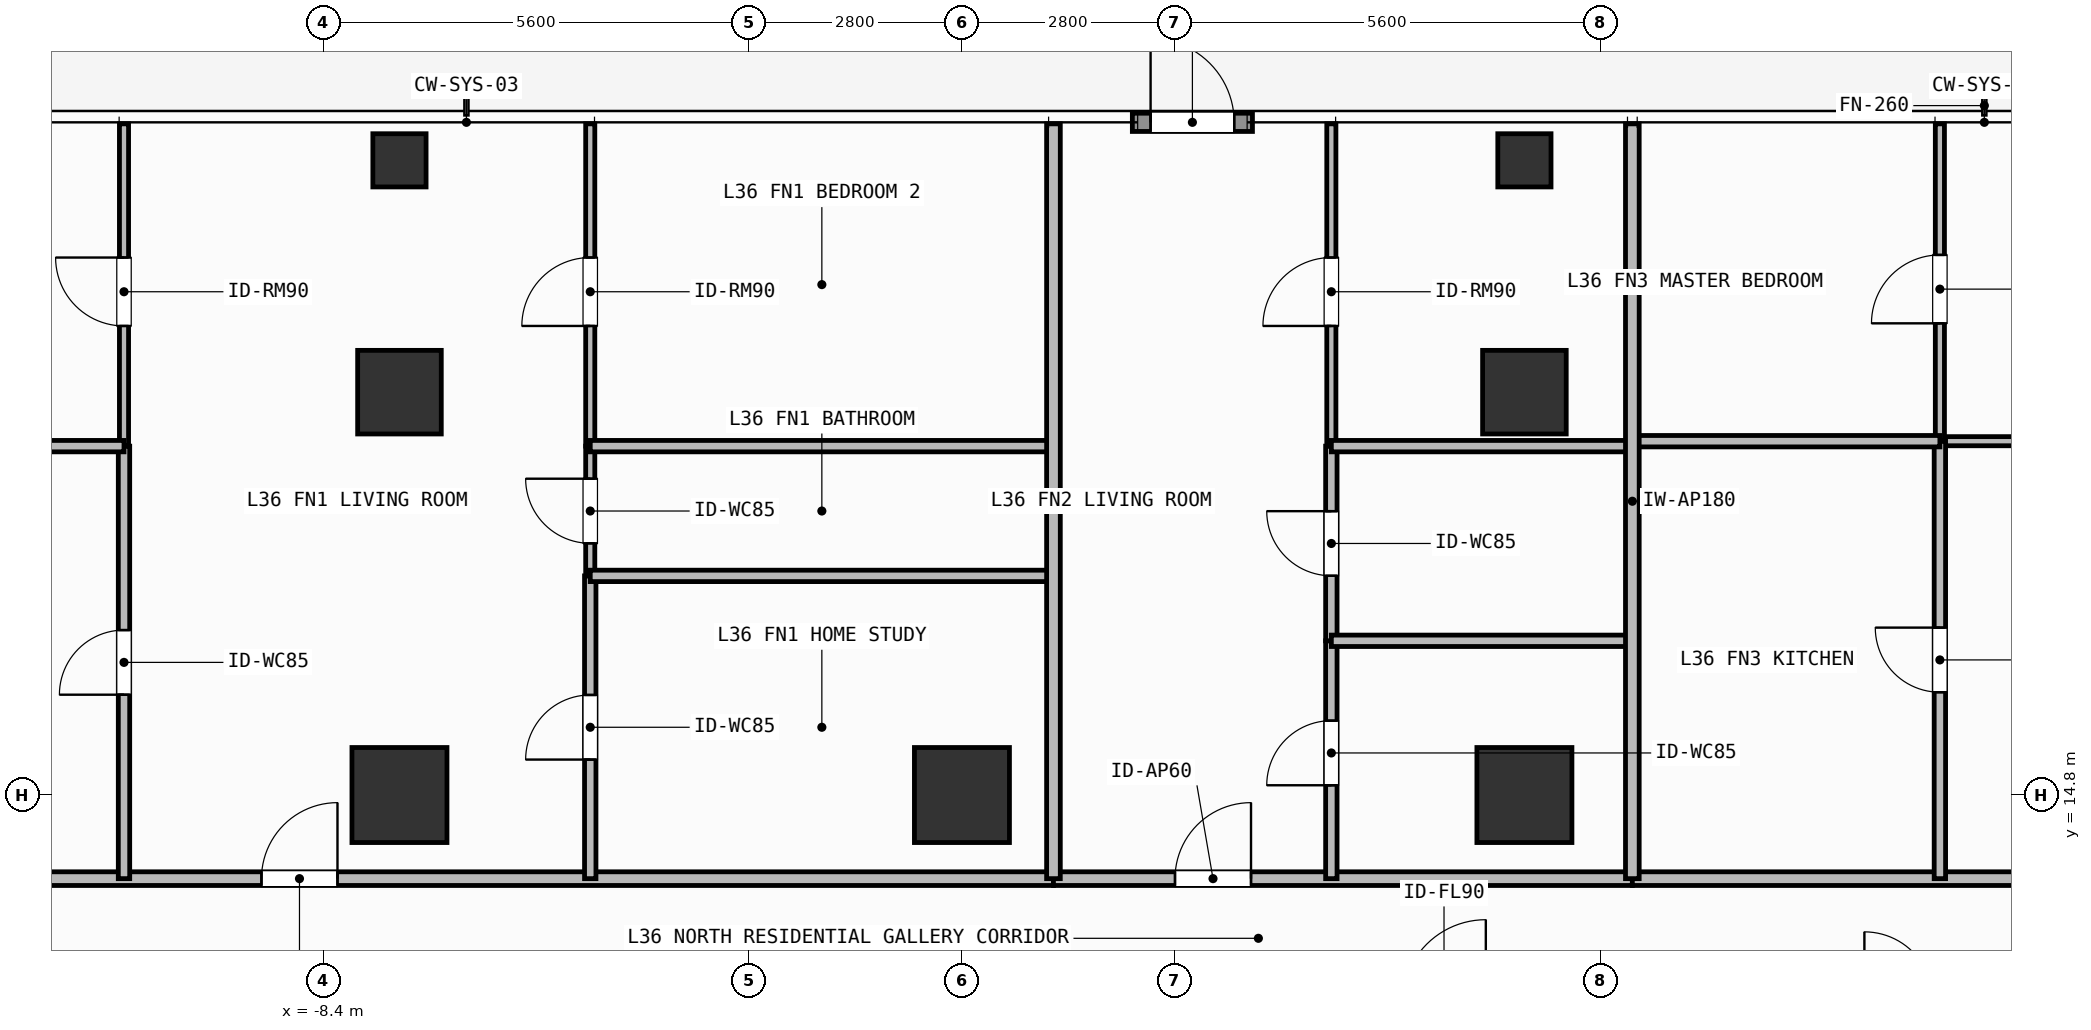
"""IFC4 building model, lengths in metres.
Left out: names, types, materials, properties, quantities, classifications, styles, units other than length and angle.
Written with IfcOpenShell. Run it as: python <this file> out.ifc"""

import sys

from ifc_helpers import new_model, si_unit, direction, frame, frame_2d, origin, origin_2d, place, context, subcontext, project, spatial, rectangle, hollow_rectangle, extrude, element, fill, save


model = new_model("IFC4")
c1 = context("Model", 3, precision=1e-05, world=origin(), true_north=direction((0.0, 1.0)))
c2 = subcontext(c1, "Body", "Model", "MODEL_VIEW")
j1 = project(units=[si_unit("LENGTHUNIT", "METRE"), si_unit("PLANEANGLEUNIT", "RADIAN")], contexts=[c1])
p1 = place(None, origin())
s1 = spatial("IfcSite", under=j1, at=p1, CompositionType="ELEMENT")
p2 = place(p1, origin())
s2 = spatial("IfcBuilding", under=s1, at=p2, CompositionType="ELEMENT")
p3 = place(p2, frame((0.0, 0.0, 144.6)))
s3 = spatial("IfcBuildingStorey", under=s2, at=p3, CompositionType="ELEMENT", Elevation=144.6)
for number, where, z_axis, x_axis in (
    (1, (-7.4, 14.8, 0.0), (0.0, 0.0, 1.0), (1.0, 0.0, 0.0)),
    (2, (0.0, 14.8, 0.0), (0.0, 0.0, 1.0), (1.0, 0.0, 0.0)),
    (3, (7.4, 14.8, 0.0), (0.0, 0.0, 1.0), (1.0, 0.0, 0.0)),
):
    element("IfcColumn", number, at=place(p3, frame(where, z_axis=z_axis, x_axis=x_axis)), inside=s3, PredefinedType="COLUMN", context=c2, shape_type="SweptSolid", body=[
        extrude(rectangle(XDim=1.25, YDim=1.25, at=origin_2d()), origin(), (0.0, 0.0, 1.0), 3.9),
    ])
for number, where, z_axis, x_axis in (
    (4, (-7.4, 20.1, 0.0), (0.0, 0.0, 1.0), (1.0, 0.0, 0.0)),
    (5, (7.4, 20.1, 0.0), (0.0, 0.0, 1.0), (1.0, 0.0, 0.0)),
):
    element("IfcColumn", number, at=place(p3, frame(where, z_axis=z_axis, x_axis=x_axis)), inside=s3, PredefinedType="COLUMN", context=c2, shape_type="SweptSolid", body=[
        extrude(rectangle(XDim=1.1, YDim=1.1, at=origin_2d()), origin(), (0.0, 0.0, 1.0), 3.9),
    ])
for number, where, z_axis, x_axis in (
    (6, (-7.4, 23.15, 0.0), (0.0, 0.0, 1.0), (1.0, 0.0, 0.0)),
    (7, (7.4, 23.15, 0.0), (0.0, 0.0, 1.0), (1.0, 0.0, 0.0)),
):
    element("IfcColumn", number, at=place(p3, frame(where, z_axis=z_axis, x_axis=x_axis)), inside=s3, PredefinedType="COLUMN", context=c2, shape_type="SweptSolid", body=[
        extrude(hollow_rectangle(XDim=0.7, YDim=0.7, WallThickness=0.032, at=origin_2d()), origin(), (0.0, 0.0, 1.0), 3.9),
    ])
p4 = place(p3, frame((2.242, 23.65, 0.0), z_axis=(0.0, 0.0, 1.0), x_axis=(1.0, 0.0, 0.0)))
e8 = element("IfcWall", 8, at=p4, inside=s3, PredefinedType="SOLIDWALL", context=c2, shape_type="SweptSolid", body=[
    extrude(rectangle(XDim=1.58, YDim=0.24, at=frame_2d((0.79, 0.0))), origin(), (0.0, 0.0, 1.0), 3.68),
])
p5 = place(p4, frame((0.24, 0.0, 0.0)))
e9 = element("IfcOpeningElement", 9, at=p5, cuts=e8, PredefinedType="OPENING", context=c2, shape_type="SweptSolid", body=[
    extrude(rectangle(XDim=1.1, YDim=2.2, at=frame_2d((0.55, 1.1))), frame((0.0, 0.13, 0.0), z_axis=(0.0, -1.0, 0.0), x_axis=(1.0, 0.0, 0.0)), (0.0, 0.0, 1.0), 0.26),
])
p6 = place(p3, frame((-16.32, 13.7, 0.0), z_axis=(0.0, 0.0, 1.0), x_axis=(1.0, 0.0, 0.0)))
e10 = element("IfcWall", 10, at=p6, inside=s3, PredefinedType="PARTITIONING", context=c2, shape_type="SweptSolid", body=[
    extrude(rectangle(XDim=17.524, YDim=0.18, at=frame_2d((8.762, 0.0))), origin(), (0.0, 0.0, 1.0), 3.68),
])
p7 = place(p6, frame((7.104, 0.0, 0.0)))
e11 = element("IfcOpeningElement", 11, at=p7, cuts=e10, PredefinedType="OPENING", context=c2, shape_type="SweptSolid", body=[
    extrude(rectangle(XDim=1.0, YDim=2.2, at=frame_2d((0.5, 1.1))), frame((0.0, 0.1, 0.0), z_axis=(0.0, -1.0, 0.0), x_axis=(1.0, 0.0, 0.0)), (0.0, 0.0, 1.0), 0.2),
])
p8 = place(p3, frame((-11.024, 13.7, 0.0), z_axis=(0.0, 0.0, 1.0), x_axis=(0.0, 1.0, 0.0)))
e12 = element("IfcWall", 12, at=p8, inside=s3, PredefinedType="PARTITIONING", context=c2, shape_type="SweptSolid", body=[
    extrude(rectangle(XDim=5.69, YDim=0.15, at=frame_2d((2.845, 0.0))), origin(), (0.0, 0.0, 1.0), 3.68),
])
p9 = place(p8, frame((2.42, 0.0, 0.0)))
e13 = element("IfcOpeningElement", 13, at=p9, cuts=e12, PredefinedType="OPENING", context=c2, shape_type="SweptSolid", body=[
    extrude(rectangle(XDim=0.85, YDim=2.1, at=frame_2d((0.425, 1.05))), frame((0.0, 0.085, 0.0), z_axis=(0.0, -1.0, 0.0), x_axis=(1.0, 0.0, 0.0)), (0.0, 0.0, 1.0), 0.17),
])
p10 = place(p3, frame((-11.024, 19.39, 0.0), z_axis=(0.0, 0.0, 1.0), x_axis=(0.0, 1.0, 0.0)))
e14 = element("IfcWall", 14, at=p10, inside=s3, PredefinedType="PARTITIONING", context=c2, shape_type="SweptSolid", body=[
    extrude(rectangle(XDim=4.24, YDim=0.12, at=frame_2d((2.12, 0.0))), origin(), (0.0, 0.0, 1.0), 3.37),
])
p11 = place(p10, frame((1.581, 0.0, 0.0)))
e15 = element("IfcOpeningElement", 15, at=p11, cuts=e14, PredefinedType="OPENING", context=c2, shape_type="SweptSolid", body=[
    extrude(rectangle(XDim=0.9, YDim=2.1, at=frame_2d((0.45, 1.05))), frame((0.0, 0.07, 0.0), z_axis=(0.0, -1.0, 0.0), x_axis=(1.0, 0.0, 0.0)), (0.0, 0.0, 1.0), 0.14),
])
p12 = place(p3, frame((-4.89, 13.7, 0.0), z_axis=(0.0, 0.0, 1.0), x_axis=(0.0, 1.0, 0.0)))
e16 = element("IfcWall", 16, at=p12, inside=s3, PredefinedType="PARTITIONING", context=c2, shape_type="SweptSolid", body=[
    extrude(rectangle(XDim=3.983, YDim=0.15, at=frame_2d((1.992, 0.0))), origin(), (0.0, 0.0, 1.0), 3.68),
])
p13 = place(p12, frame((1.566, 0.0, 0.0)))
e17 = element("IfcOpeningElement", 17, at=p13, cuts=e16, PredefinedType="OPENING", context=c2, shape_type="SweptSolid", body=[
    extrude(rectangle(XDim=0.85, YDim=2.1, at=frame_2d((0.425, 1.05))), frame((0.0, 0.085, 0.0), z_axis=(0.0, -1.0, 0.0), x_axis=(1.0, 0.0, 0.0)), (0.0, 0.0, 1.0), 0.17),
])
p14 = place(p3, frame((-4.89, 17.683, 0.0), z_axis=(0.0, 0.0, 1.0), x_axis=(0.0, 1.0, 0.0)))
e18 = element("IfcWall", 18, at=p14, inside=s3, PredefinedType="PARTITIONING", context=c2, shape_type="SweptSolid", body=[
    extrude(rectangle(XDim=1.707, YDim=0.12, at=frame_2d((0.854, 0.0))), origin(), (0.0, 0.0, 1.0), 3.68),
])
p15 = place(p14, frame((0.428, 0.0, 0.0)))
e19 = element("IfcOpeningElement", 19, at=p15, cuts=e18, PredefinedType="OPENING", context=c2, shape_type="SweptSolid", body=[
    extrude(rectangle(XDim=0.85, YDim=2.1, at=frame_2d((0.425, 1.05))), frame((0.0, 0.07, 0.0), z_axis=(0.0, -1.0, 0.0), x_axis=(1.0, 0.0, 0.0)), (0.0, 0.0, 1.0), 0.14),
])
p16 = place(p3, frame((-4.89, 19.39, 0.0), z_axis=(0.0, 0.0, 1.0), x_axis=(0.0, 1.0, 0.0)))
e20 = element("IfcWall", 20, at=p16, inside=s3, PredefinedType="PARTITIONING", context=c2, shape_type="SweptSolid", body=[
    extrude(rectangle(XDim=4.24, YDim=0.12, at=frame_2d((2.12, 0.0))), origin(), (0.0, 0.0, 1.0), 3.68),
])
p17 = place(p16, frame((1.581, 0.0, 0.0)))
e21 = element("IfcOpeningElement", 21, at=p17, cuts=e20, PredefinedType="OPENING", context=c2, shape_type="SweptSolid", body=[
    extrude(rectangle(XDim=0.9, YDim=2.1, at=frame_2d((0.45, 1.05))), frame((0.0, 0.07, 0.0), z_axis=(0.0, -1.0, 0.0), x_axis=(1.0, 0.0, 0.0)), (0.0, 0.0, 1.0), 0.14),
])
p18 = place(p3, frame((1.204, 13.7, 0.0), z_axis=(0.0, 0.0, 1.0), x_axis=(1.0, 0.0, 0.0)))
e22 = element("IfcWall", 22, at=p18, inside=s3, PredefinedType="PARTITIONING", context=c2, shape_type="SweptSolid", body=[
    extrude(rectangle(XDim=7.616, YDim=0.18, at=frame_2d((3.808, 0.0))), origin(), (0.0, 0.0, 1.0), 3.68),
])
p19 = place(p18, frame((1.599, 0.0, 0.0)))
e23 = element("IfcOpeningElement", 23, at=p19, cuts=e22, PredefinedType="OPENING", context=c2, shape_type="SweptSolid", body=[
    extrude(rectangle(XDim=1.0, YDim=2.2, at=frame_2d((0.5, 1.1))), frame((0.0, 0.1, 0.0), z_axis=(0.0, -1.0, 0.0), x_axis=(1.0, 0.0, 0.0)), (0.0, 0.0, 1.0), 0.2),
])
p20 = place(p3, frame((4.86, 13.7, 0.0), z_axis=(0.0, 0.0, 1.0), x_axis=(0.0, 1.0, 0.0)))
e24 = element("IfcWall", 24, at=p20, inside=s3, PredefinedType="PARTITIONING", context=c2, shape_type="SweptSolid", body=[
    extrude(rectangle(XDim=3.129, YDim=0.15, at=frame_2d((1.564, 0.0))), origin(), (0.0, 0.0, 1.0), 3.68),
])
p21 = place(p20, frame((1.229, 0.0, 0.0)))
e25 = element("IfcOpeningElement", 25, at=p21, cuts=e24, PredefinedType="OPENING", context=c2, shape_type="SweptSolid", body=[
    extrude(rectangle(XDim=0.85, YDim=2.1, at=frame_2d((0.425, 1.05))), frame((0.0, 0.085, 0.0), z_axis=(0.0, -1.0, 0.0), x_axis=(1.0, 0.0, 0.0)), (0.0, 0.0, 1.0), 0.17),
])
p22 = place(p3, frame((4.86, 16.829, 0.0), z_axis=(0.0, 0.0, 1.0), x_axis=(0.0, 1.0, 0.0)))
e26 = element("IfcWall", 26, at=p22, inside=s3, PredefinedType="PARTITIONING", context=c2, shape_type="SweptSolid", body=[
    extrude(rectangle(XDim=2.561, YDim=0.15, at=frame_2d((1.28, 0.0))), origin(), (0.0, 0.0, 1.0), 3.68),
])
p23 = place(p22, frame((0.855, 0.0, 0.0)))
e27 = element("IfcOpeningElement", 27, at=p23, cuts=e26, PredefinedType="OPENING", context=c2, shape_type="SweptSolid", body=[
    extrude(rectangle(XDim=0.85, YDim=2.1, at=frame_2d((0.425, 1.05))), frame((0.0, 0.085, 0.0), z_axis=(0.0, -1.0, 0.0), x_axis=(1.0, 0.0, 0.0)), (0.0, 0.0, 1.0), 0.17),
])
p24 = place(p3, frame((4.86, 19.39, 0.0), z_axis=(0.0, 0.0, 1.0), x_axis=(0.0, 1.0, 0.0)))
e28 = element("IfcWall", 28, at=p24, inside=s3, PredefinedType="PARTITIONING", context=c2, shape_type="SweptSolid", body=[
    extrude(rectangle(XDim=4.24, YDim=0.12, at=frame_2d((2.12, 0.0))), origin(), (0.0, 0.0, 1.0), 3.68),
])
p25 = place(p24, frame((1.581, 0.0, 0.0)))
e29 = element("IfcOpeningElement", 29, at=p25, cuts=e28, PredefinedType="OPENING", context=c2, shape_type="SweptSolid", body=[
    extrude(rectangle(XDim=0.9, YDim=2.1, at=frame_2d((0.45, 1.05))), frame((0.0, 0.07, 0.0), z_axis=(0.0, -1.0, 0.0), x_axis=(1.0, 0.0, 0.0)), (0.0, 0.0, 1.0), 0.14),
])
p26 = place(p3, frame((8.82, 13.7, 0.0), z_axis=(0.0, 0.0, 1.0), x_axis=(1.0, 0.0, 0.0)))
e30 = element("IfcWall", 30, at=p26, inside=s3, PredefinedType="PARTITIONING", context=c2, shape_type="SweptSolid", body=[
    extrude(rectangle(XDim=15.3, YDim=0.18, at=frame_2d((7.65, 0.0))), origin(), (0.0, 0.0, 1.0), 3.68),
])
p27 = place(p26, frame((7.688, 0.0, 0.0)))
e31 = element("IfcOpeningElement", 31, at=p27, cuts=e30, PredefinedType="OPENING", context=c2, shape_type="SweptSolid", body=[
    extrude(rectangle(XDim=1.0, YDim=2.2, at=frame_2d((0.5, 1.1))), frame((0.0, 0.1, 0.0), z_axis=(0.0, -1.0, 0.0), x_axis=(1.0, 0.0, 0.0)), (0.0, 0.0, 1.0), 0.2),
])
p28 = place(p3, frame((12.866, 19.455, 0.0), z_axis=(0.0, 0.0, 1.0), x_axis=(1.0, 0.0, 0.0)))
e32 = element("IfcWall", 32, at=p28, inside=s3, PredefinedType="PARTITIONING", context=c2, shape_type="SweptSolid", body=[
    extrude(rectangle(XDim=8.404, YDim=0.12, at=frame_2d((4.202, 0.0))), origin(), (0.0, 0.0, 1.0), 3.68),
])
p29 = place(p28, frame((3.752, 0.0, 0.0)))
e33 = element("IfcOpeningElement", 33, at=p29, cuts=e32, PredefinedType="OPENING", context=c2, shape_type="SweptSolid", body=[
    extrude(rectangle(XDim=0.9, YDim=2.1, at=frame_2d((0.45, 1.05))), frame((0.0, 0.07, 0.0), z_axis=(0.0, -1.0, 0.0), x_axis=(1.0, 0.0, 0.0)), (0.0, 0.0, 1.0), 0.14),
])
p30 = place(p3, frame((12.866, 13.7, 0.0), z_axis=(0.0, 0.0, 1.0), x_axis=(0.0, 1.0, 0.0)))
e34 = element("IfcWall", 34, at=p30, inside=s3, PredefinedType="PARTITIONING", context=c2, shape_type="SweptSolid", body=[
    extrude(rectangle(XDim=5.755, YDim=0.15, at=frame_2d((2.877, 0.0))), origin(), (0.0, 0.0, 1.0), 3.68),
])
p31 = place(p30, frame((2.452, 0.0, 0.0)))
e35 = element("IfcOpeningElement", 35, at=p31, cuts=e34, PredefinedType="OPENING", context=c2, shape_type="SweptSolid", body=[
    extrude(rectangle(XDim=0.85, YDim=2.1, at=frame_2d((0.425, 1.05))), frame((0.0, 0.085, 0.0), z_axis=(0.0, -1.0, 0.0), x_axis=(1.0, 0.0, 0.0)), (0.0, 0.0, 1.0), 0.17),
])
p32 = place(p3, frame((12.866, 19.455, 0.0), z_axis=(0.0, 0.0, 1.0), x_axis=(0.0, 1.0, 0.0)))
e36 = element("IfcWall", 36, at=p32, inside=s3, PredefinedType="PARTITIONING", context=c2, shape_type="SweptSolid", body=[
    extrude(rectangle(XDim=4.175, YDim=0.12, at=frame_2d((2.087, 0.0))), origin(), (0.0, 0.0, 1.0), 3.68),
])
p33 = place(p32, frame((1.551, 0.0, 0.0)))
e37 = element("IfcOpeningElement", 37, at=p33, cuts=e36, PredefinedType="OPENING", context=c2, shape_type="SweptSolid", body=[
    extrude(rectangle(XDim=0.9, YDim=2.1, at=frame_2d((0.45, 1.05))), frame((0.0, 0.07, 0.0), z_axis=(0.0, -1.0, 0.0), x_axis=(1.0, 0.0, 0.0)), (0.0, 0.0, 1.0), 0.14),
])
p34 = place(p3, frame((-16.32, 19.39, 0.0), z_axis=(0.0, 0.0, 1.0), x_axis=(1.0, 0.0, 0.0)))
e38 = element("IfcWall", 38, at=p34, inside=s3, PredefinedType="PARTITIONING", context=c2, shape_type="SweptSolid", body=[
    extrude(rectangle(XDim=5.296, YDim=0.15, at=frame_2d((2.648, 0.0))), origin(), (0.0, 0.0, 1.0), 3.68),
])
for number, where, z_axis, x_axis in (
    (39, (-4.89, 17.683, 0.0), (0.0, 0.0, 1.0), (1.0, 0.0, 0.0)),
    (40, (-4.89, 19.39, 0.0), (0.0, 0.0, 1.0), (1.0, 0.0, 0.0)),
):
    element("IfcWall", number, at=place(p3, frame(where, z_axis=z_axis, x_axis=x_axis)), inside=s3, PredefinedType="PARTITIONING", context=c2, shape_type="SweptSolid", body=[
        extrude(rectangle(XDim=6.094, YDim=0.15, at=frame_2d((3.047, 0.0))), origin(), (0.0, 0.0, 1.0), 3.68),
    ])
for number, where, z_axis, x_axis in (
    (41, (4.86, 16.829, 0.0), (0.0, 0.0, 1.0), (1.0, 0.0, 0.0)),
    (42, (4.86, 19.39, 0.0), (0.0, 0.0, 1.0), (1.0, 0.0, 0.0)),
):
    element("IfcWall", number, at=place(p3, frame(where, z_axis=z_axis, x_axis=x_axis)), inside=s3, PredefinedType="PARTITIONING", context=c2, shape_type="SweptSolid", body=[
        extrude(rectangle(XDim=3.96, YDim=0.15, at=frame_2d((1.98, 0.0))), origin(), (0.0, 0.0, 1.0), 3.68),
    ])
p35 = place(p3, frame((1.204, 13.7, 0.0), z_axis=(0.0, 0.0, 1.0), x_axis=(0.0, 1.0, 0.0)))
e43 = element("IfcWall", 43, at=p35, inside=s3, PredefinedType="PARTITIONING", context=c2, shape_type="SweptSolid", body=[
    extrude(rectangle(XDim=9.93, YDim=0.18, at=frame_2d((4.965, 0.0))), origin(), (0.0, 0.0, 1.0), 3.68),
])
p36 = place(p3, frame((8.82, 19.455, 0.0), z_axis=(0.0, 0.0, 1.0), x_axis=(1.0, 0.0, 0.0)))
e44 = element("IfcWall", 44, at=p36, inside=s3, PredefinedType="PARTITIONING", context=c2, shape_type="SweptSolid", body=[
    extrude(rectangle(XDim=4.046, YDim=0.15, at=frame_2d((2.023, 0.0))), origin(), (0.0, 0.0, 1.0), 3.68),
])
p37 = place(p3, frame((8.82, 13.7, 0.0), z_axis=(0.0, 0.0, 1.0), x_axis=(0.0, 1.0, 0.0)))
e45 = element("IfcWall", 45, at=p37, inside=s3, PredefinedType="PARTITIONING", context=c2, shape_type="SweptSolid", body=[
    extrude(rectangle(XDim=9.93, YDim=0.18, at=frame_2d((4.965, 0.0))), origin(), (0.0, 0.0, 1.0), 3.68),
])
p38 = place(p5, origin())
e46 = element("IfcDoor", 46, at=p38, inside=s3, OperationType="SINGLE_SWING_LEFT", PredefinedType="DOOR", context=c2, shape_type="SweptSolid", body=[
    extrude(rectangle(XDim=1.1, YDim=2.2, at=frame_2d((0.55, 1.1))), frame((0.0, 0.025, 0.0), z_axis=(0.0, -1.0, 0.0), x_axis=(1.0, 0.0, 0.0)), (0.0, 0.0, 1.0), 0.05),
])
fill(e9, e46)
p39 = place(p7, origin())
e47 = element("IfcDoor", 47, at=p39, inside=s3, OperationType="SINGLE_SWING_RIGHT", PredefinedType="DOOR", context=c2, shape_type="SweptSolid", body=[
    extrude(rectangle(XDim=1.0, YDim=2.2, at=frame_2d((0.5, 1.1))), frame((0.0, 0.025, 0.0), z_axis=(0.0, -1.0, 0.0), x_axis=(1.0, 0.0, 0.0)), (0.0, 0.0, 1.0), 0.05),
])
fill(e11, e47)
p40 = place(p9, origin())
e48 = element("IfcDoor", 48, at=p40, inside=s3, OperationType="SINGLE_SWING_LEFT", PredefinedType="DOOR", context=c2, shape_type="SweptSolid", body=[
    extrude(rectangle(XDim=0.85, YDim=2.1, at=frame_2d((0.425, 1.05))), frame((0.0, 0.025, 0.0), z_axis=(0.0, -1.0, 0.0), x_axis=(1.0, 0.0, 0.0)), (0.0, 0.0, 1.0), 0.05),
])
fill(e13, e48)
p41 = place(p11, origin())
e49 = element("IfcDoor", 49, at=p41, inside=s3, OperationType="SINGLE_SWING_RIGHT", PredefinedType="DOOR", context=c2, shape_type="SweptSolid", body=[
    extrude(rectangle(XDim=0.9, YDim=2.1, at=frame_2d((0.45, 1.05))), frame((0.0, 0.025, 0.0), z_axis=(0.0, -1.0, 0.0), x_axis=(1.0, 0.0, 0.0)), (0.0, 0.0, 1.0), 0.05),
])
fill(e15, e49)
p42 = place(p13, origin())
e50 = element("IfcDoor", 50, at=p42, inside=s3, OperationType="SINGLE_SWING_LEFT", PredefinedType="DOOR", context=c2, shape_type="SweptSolid", body=[
    extrude(rectangle(XDim=0.85, YDim=2.1, at=frame_2d((0.425, 1.05))), frame((0.0, 0.025, 0.0), z_axis=(0.0, -1.0, 0.0), x_axis=(1.0, 0.0, 0.0)), (0.0, 0.0, 1.0), 0.05),
])
fill(e17, e50)
p43 = place(p15, origin())
e51 = element("IfcDoor", 51, at=p43, inside=s3, OperationType="SINGLE_SWING_RIGHT", PredefinedType="DOOR", context=c2, shape_type="SweptSolid", body=[
    extrude(rectangle(XDim=0.85, YDim=2.1, at=frame_2d((0.425, 1.05))), frame((0.0, 0.025, 0.0), z_axis=(0.0, -1.0, 0.0), x_axis=(1.0, 0.0, 0.0)), (0.0, 0.0, 1.0), 0.05),
])
fill(e19, e51)
p44 = place(p17, origin())
e52 = element("IfcDoor", 52, at=p44, inside=s3, OperationType="SINGLE_SWING_LEFT", PredefinedType="DOOR", context=c2, shape_type="SweptSolid", body=[
    extrude(rectangle(XDim=0.9, YDim=2.1, at=frame_2d((0.45, 1.05))), frame((0.0, 0.025, 0.0), z_axis=(0.0, -1.0, 0.0), x_axis=(1.0, 0.0, 0.0)), (0.0, 0.0, 1.0), 0.05),
])
fill(e21, e52)
p45 = place(p19, origin())
e53 = element("IfcDoor", 53, at=p45, inside=s3, OperationType="SINGLE_SWING_RIGHT", PredefinedType="DOOR", context=c2, shape_type="SweptSolid", body=[
    extrude(rectangle(XDim=1.0, YDim=2.2, at=frame_2d((0.5, 1.1))), frame((0.0, 0.025, 0.0), z_axis=(0.0, -1.0, 0.0), x_axis=(1.0, 0.0, 0.0)), (0.0, 0.0, 1.0), 0.05),
])
fill(e23, e53)
p46 = place(p21, origin())
e54 = element("IfcDoor", 54, at=p46, inside=s3, OperationType="SINGLE_SWING_LEFT", PredefinedType="DOOR", context=c2, shape_type="SweptSolid", body=[
    extrude(rectangle(XDim=0.85, YDim=2.1, at=frame_2d((0.425, 1.05))), frame((0.0, 0.025, 0.0), z_axis=(0.0, -1.0, 0.0), x_axis=(1.0, 0.0, 0.0)), (0.0, 0.0, 1.0), 0.05),
])
fill(e25, e54)
p47 = place(p23, origin())
e55 = element("IfcDoor", 55, at=p47, inside=s3, OperationType="SINGLE_SWING_RIGHT", PredefinedType="DOOR", context=c2, shape_type="SweptSolid", body=[
    extrude(rectangle(XDim=0.85, YDim=2.1, at=frame_2d((0.425, 1.05))), frame((0.0, 0.025, 0.0), z_axis=(0.0, -1.0, 0.0), x_axis=(1.0, 0.0, 0.0)), (0.0, 0.0, 1.0), 0.05),
])
fill(e27, e55)
p48 = place(p25, origin())
e56 = element("IfcDoor", 56, at=p48, inside=s3, OperationType="SINGLE_SWING_LEFT", PredefinedType="DOOR", context=c2, shape_type="SweptSolid", body=[
    extrude(rectangle(XDim=0.9, YDim=2.1, at=frame_2d((0.45, 1.05))), frame((0.0, 0.025, 0.0), z_axis=(0.0, -1.0, 0.0), x_axis=(1.0, 0.0, 0.0)), (0.0, 0.0, 1.0), 0.05),
])
fill(e29, e56)
p49 = place(p31, origin())
e57 = element("IfcDoor", 57, at=p49, inside=s3, OperationType="SINGLE_SWING_RIGHT", PredefinedType="DOOR", context=c2, shape_type="SweptSolid", body=[
    extrude(rectangle(XDim=0.85, YDim=2.1, at=frame_2d((0.425, 1.05))), frame((0.0, 0.025, 0.0), z_axis=(0.0, -1.0, 0.0), x_axis=(1.0, 0.0, 0.0)), (0.0, 0.0, 1.0), 0.05),
])
fill(e35, e57)
p50 = place(p33, origin())
e58 = element("IfcDoor", 58, at=p50, inside=s3, OperationType="SINGLE_SWING_LEFT", PredefinedType="DOOR", context=c2, shape_type="SweptSolid", body=[
    extrude(rectangle(XDim=0.9, YDim=2.1, at=frame_2d((0.45, 1.05))), frame((0.0, 0.025, 0.0), z_axis=(0.0, -1.0, 0.0), x_axis=(1.0, 0.0, 0.0)), (0.0, 0.0, 1.0), 0.05),
])
fill(e37, e58)
save(model, sys.argv[1])
